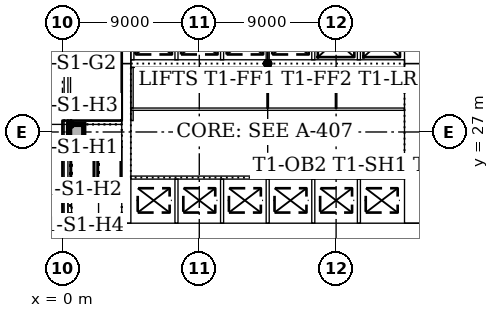
"""IFC4 building model, lengths in metres.
Left out: names, types, materials, properties, quantities, classifications, styles, units other than length and angle.
Written with IfcOpenShell. Run it as: python <this file> out.ifc"""

import sys

from ifc_helpers import new_model, si_unit, direction, frame, frame_2d, origin, origin_2d, place, context, subcontext, project, spatial, rectangle, extrude, element, fill, save


model = new_model("IFC4")
c1 = context("Model", 3, precision=1e-05, world=origin(), true_north=direction((0.0, 1.0)))
c2 = subcontext(c1, "Body", "Model", "MODEL_VIEW")
j1 = project(units=[si_unit("LENGTHUNIT", "METRE"), si_unit("PLANEANGLEUNIT", "RADIAN")], contexts=[c1])
p1 = place(None, origin())
s1 = spatial("IfcSite", under=j1, at=p1, CompositionType="ELEMENT")
p2 = place(p1, origin())
s2 = spatial("IfcBuilding", under=s1, at=p2, CompositionType="ELEMENT")
p3 = place(p2, origin())
s3 = spatial("IfcBuildingStorey", under=s2, at=p3, CompositionType="ELEMENT", Elevation=0.0)
p4 = place(p3, frame((3.9, 20.4, 0.0), z_axis=(0.0, 0.0, 1.0), x_axis=(1.0, 0.0, 0.0)))
e1 = element("IfcWall", 1, at=p4, inside=s3, PredefinedType="SOLIDWALL", context=c2, shape_type="SweptSolid", body=[
    extrude(rectangle(XDim=19.8, YDim=1.2, at=frame_2d((9.9, 0.0))), origin(), (0.0, 0.0, 1.0), 6.0),
])
p5 = place(p3, frame((23.1, 21.0, 0.0), z_axis=(0.0, 0.0, 1.0), x_axis=(0.0, 1.0, 0.0)))
e2 = element("IfcWall", 2, at=p5, inside=s3, PredefinedType="SOLIDWALL", context=c2, shape_type="SweptSolid", body=[
    extrude(rectangle(XDim=10.5, YDim=1.2, at=frame_2d((5.25, 0.0))), origin(), (0.0, 0.0, 1.0), 6.0),
])
p6 = place(p5, frame((4.35, 0.0, 0.0)))
e3 = element("IfcOpeningElement", 3, at=p6, cuts=e2, PredefinedType="OPENING", context=c2, shape_type="SweptSolid", body=[
    extrude(rectangle(XDim=1.8, YDim=2.1, at=frame_2d((0.9, 1.05))), frame((0.0, 0.61, 0.0), z_axis=(0.0, -1.0, 0.0), x_axis=(1.0, 0.0, 0.0)), (0.0, 0.0, 1.0), 1.22),
])
p7 = place(p3, frame((23.1, 31.5, 0.0), z_axis=(0.0, 0.0, 1.0), x_axis=(0.0, 1.0, 0.0)))
e4 = element("IfcWall", 4, at=p7, inside=s3, PredefinedType="SOLIDWALL", context=c2, shape_type="SweptSolid", body=[
    extrude(rectangle(XDim=10.5, YDim=1.2, at=frame_2d((5.25, 0.0))), origin(), (0.0, 0.0, 1.0), 6.0),
])
p8 = place(p7, frame((3.15, 0.0, 0.0)))
e5 = element("IfcOpeningElement", 5, at=p8, cuts=e4, PredefinedType="OPENING", context=c2, shape_type="SweptSolid", body=[
    extrude(rectangle(XDim=1.0, YDim=2.1, at=frame_2d((0.5, 1.05))), frame((0.0, 0.61, 0.0), z_axis=(0.0, -1.0, 0.0), x_axis=(1.0, 0.0, 0.0)), (0.0, 0.0, 1.0), 1.22),
])
p9 = place(p7, frame((5.2, 0.0, 0.0)))
e6 = element("IfcOpeningElement", 6, at=p9, cuts=e4, PredefinedType="OPENING", context=c2, shape_type="SweptSolid", body=[
    extrude(rectangle(XDim=1.0, YDim=2.1, at=frame_2d((0.5, 1.05))), frame((0.0, 0.61, 0.0), z_axis=(0.0, -1.0, 0.0), x_axis=(1.0, 0.0, 0.0)), (0.0, 0.0, 1.0), 1.22),
])
p10 = place(p3, frame((4.2, 42.0, 0.0), z_axis=(0.0, 0.0, 1.0), x_axis=(0.0, -1.0, 0.0)))
e7 = element("IfcWall", 7, at=p10, inside=s3, PredefinedType="SOLIDWALL", context=c2, shape_type="SweptSolid", body=[
    extrude(rectangle(XDim=10.5, YDim=0.6, at=frame_2d((5.25, 0.0))), origin(), (0.0, 0.0, 1.0), 6.0),
])
p11 = place(p10, frame((5.3, 0.0, 0.0)))
e8 = element("IfcOpeningElement", 8, at=p11, cuts=e7, PredefinedType="OPENING", context=c2, shape_type="SweptSolid", body=[
    extrude(rectangle(XDim=1.0, YDim=2.1, at=frame_2d((0.5, 1.05))), frame((0.0, 0.31, 0.0), z_axis=(0.0, -1.0, 0.0), x_axis=(1.0, 0.0, 0.0)), (0.0, 0.0, 1.0), 0.62),
])
p12 = place(p3, frame((4.2, 31.5, 0.0), z_axis=(0.0, 0.0, 1.0), x_axis=(0.0, -1.0, 0.0)))
e9 = element("IfcWall", 9, at=p12, inside=s3, PredefinedType="SOLIDWALL", context=c2, shape_type="SweptSolid", body=[
    extrude(rectangle(XDim=10.5, YDim=0.6, at=frame_2d((5.25, 0.0))), origin(), (0.0, 0.0, 1.0), 6.0),
])
p13 = place(p12, frame((4.25, 0.0, 0.0)))
e10 = element("IfcOpeningElement", 10, at=p13, cuts=e9, PredefinedType="OPENING", context=c2, shape_type="SweptSolid", body=[
    extrude(rectangle(XDim=1.0, YDim=2.1, at=frame_2d((0.5, 1.05))), frame((0.0, 0.31, 0.0), z_axis=(0.0, -1.0, 0.0), x_axis=(1.0, 0.0, 0.0)), (0.0, 0.0, 1.0), 0.62),
])
p14 = place(p3, frame((4.5, 31.5, 0.0), z_axis=(0.0, 0.0, 1.0), x_axis=(1.0, 0.0, 0.0)))
e11 = element("IfcWall", 11, at=p14, inside=s3, PredefinedType="SOLIDWALL", context=c2, shape_type="SweptSolid", body=[
    extrude(rectangle(XDim=18.0, YDim=0.5, at=frame_2d((9.0, 0.0))), origin(), (0.0, 0.0, 1.0), 6.0),
])
p15 = place(p3, frame((0.36, 21.125, 0.0), z_axis=(0.0, 0.0, 1.0), x_axis=(1.0, 0.0, 0.0)))
e12 = element("IfcWall", 12, at=p15, inside=s3, PredefinedType="SOLIDWALL", context=c2, shape_type="SweptSolid", body=[
    extrude(rectangle(XDim=3.54, YDim=0.25, at=frame_2d((1.77, 0.0))), origin(), (0.0, 0.0, 1.0), 6.0),
])
p16 = place(p3, frame((3.9, 27.625, 0.0), z_axis=(0.0, 0.0, 1.0), x_axis=(-1.0, 0.0, 0.0)))
e13 = element("IfcWall", 13, at=p16, inside=s3, PredefinedType="SOLIDWALL", context=c2, shape_type="SweptSolid", body=[
    extrude(rectangle(XDim=3.54, YDim=0.25, at=frame_2d((1.77, 0.0))), origin(), (0.0, 0.0, 1.0), 6.0),
])
p17 = place(p16, frame((0.4, 0.0, 0.0)))
e14 = element("IfcOpeningElement", 14, at=p17, cuts=e13, PredefinedType="OPENING", context=c2, shape_type="SweptSolid", body=[
    extrude(rectangle(XDim=1.0, YDim=2.1, at=frame_2d((0.5, 1.05))), frame((0.0, 0.135, 0.0), z_axis=(0.0, -1.0, 0.0), x_axis=(1.0, 0.0, 0.0)), (0.0, 0.0, 1.0), 0.27),
])
p18 = place(p3, frame((0.235, 21.0, 0.0), z_axis=(0.0, 0.0, 1.0), x_axis=(0.0, 1.0, 0.0)))
e15 = element("IfcWall", 15, at=p18, inside=s3, PredefinedType="SOLIDWALL", context=c2, shape_type="SweptSolid", body=[
    extrude(rectangle(XDim=21.0, YDim=0.25, at=frame_2d((10.5, 0.0))), origin(), (0.0, 0.0, 1.0), 6.0),
])
p19 = place(p18, frame((10.0, 0.0, 0.0)))
e16 = element("IfcOpeningElement", 16, at=p19, cuts=e15, PredefinedType="OPENING", context=c2, shape_type="SweptSolid", body=[
    extrude(rectangle(XDim=1.0, YDim=2.1, at=frame_2d((0.5, 1.05))), frame((0.0, 0.135, 0.0), z_axis=(0.0, -1.0, 0.0), x_axis=(1.0, 0.0, 0.0)), (0.0, 0.0, 1.0), 0.27),
])
p20 = place(p3, frame((0.9, 27.0, 0.0), z_axis=(0.0, 0.0, 1.0), x_axis=(1.0, 0.0, 0.0)))
e17 = element("IfcColumn", 17, at=p20, inside=s3, PredefinedType="COLUMN", context=c2, shape_type="SweptSolid", body=[
    extrude(rectangle(XDim=1.0, YDim=1.0, at=origin_2d()), origin(), (0.0, 0.0, 1.0), 6.0),
])
p21 = place(p3, frame((0.0, 3.7, 0.0), z_axis=(0.0, 0.0, 1.0), x_axis=(0.0, 1.0, 0.0)))
e18 = element("IfcWall", 18, at=p21, inside=s3, PredefinedType="PARTITIONING", context=c2, shape_type="SweptSolid", body=[
    extrude(rectangle(XDim=17.3, YDim=0.2, at=frame_2d((8.65, 0.0))), origin(), (0.0, 0.0, 1.0), 5.7),
])
p22 = place(p21, frame((7.7, 0.0, 0.0)))
e19 = element("IfcOpeningElement", 19, at=p22, cuts=e18, PredefinedType="OPENING", context=c2, shape_type="SweptSolid", body=[
    extrude(rectangle(XDim=1.8, YDim=2.1, at=frame_2d((0.9, 1.05))), frame((0.0, 0.11, 0.0), z_axis=(0.0, -1.0, 0.0), x_axis=(1.0, 0.0, 0.0)), (0.0, 0.0, 1.0), 0.22),
])
p23 = place(p3, frame((0.48, 21.25, 0.0), z_axis=(0.0, 0.0, 1.0), x_axis=(0.0, 1.0, 0.0)))
e20 = element("IfcWall", 20, at=p23, inside=s3, PredefinedType="STANDARD", context=c2, shape_type="SweptSolid", body=[
    extrude(rectangle(XDim=1.955, YDim=0.24, at=frame_2d((0.978, 0.0))), origin(), (0.0, 0.0, 1.0), 6.0),
])
p24 = place(p3, frame((4.5, 24.0, 0.0), z_axis=(0.0, 0.0, 1.0), x_axis=(1.0, 0.0, 0.0)))
e21 = element("IfcWall", 21, at=p24, inside=s3, PredefinedType="PARTITIONING", context=c2, shape_type="SweptSolid", body=[
    extrude(rectangle(XDim=18.0, YDim=0.2, at=frame_2d((9.0, 0.0))), origin(), (0.0, 0.0, 1.0), 5.7),
])
p25 = place(p24, frame((0.95, 0.0, 0.0)))
e22 = element("IfcOpeningElement", 22, at=p25, cuts=e21, PredefinedType="OPENING", context=c2, shape_type="SweptSolid", body=[
    extrude(rectangle(XDim=1.1, YDim=2.1, at=frame_2d((0.55, 1.05))), frame((0.0, 0.11, 0.0), z_axis=(0.0, -1.0, 0.0), x_axis=(1.0, 0.0, 0.0)), (0.0, 0.0, 1.0), 0.22),
])
p26 = place(p24, frame((3.95, 0.0, 0.0)))
e23 = element("IfcOpeningElement", 23, at=p26, cuts=e21, PredefinedType="OPENING", context=c2, shape_type="SweptSolid", body=[
    extrude(rectangle(XDim=1.1, YDim=2.1, at=frame_2d((0.55, 1.05))), frame((0.0, 0.11, 0.0), z_axis=(0.0, -1.0, 0.0), x_axis=(1.0, 0.0, 0.0)), (0.0, 0.0, 1.0), 0.22),
])
p27 = place(p24, frame((6.95, 0.0, 0.0)))
e24 = element("IfcOpeningElement", 24, at=p27, cuts=e21, PredefinedType="OPENING", context=c2, shape_type="SweptSolid", body=[
    extrude(rectangle(XDim=1.1, YDim=2.1, at=frame_2d((0.55, 1.05))), frame((0.0, 0.11, 0.0), z_axis=(0.0, -1.0, 0.0), x_axis=(1.0, 0.0, 0.0)), (0.0, 0.0, 1.0), 0.22),
])
p28 = place(p24, frame((9.95, 0.0, 0.0)))
e25 = element("IfcOpeningElement", 25, at=p28, cuts=e21, PredefinedType="OPENING", context=c2, shape_type="SweptSolid", body=[
    extrude(rectangle(XDim=1.1, YDim=2.1, at=frame_2d((0.55, 1.05))), frame((0.0, 0.11, 0.0), z_axis=(0.0, -1.0, 0.0), x_axis=(1.0, 0.0, 0.0)), (0.0, 0.0, 1.0), 0.22),
])
p29 = place(p24, frame((12.95, 0.0, 0.0)))
e26 = element("IfcOpeningElement", 26, at=p29, cuts=e21, PredefinedType="OPENING", context=c2, shape_type="SweptSolid", body=[
    extrude(rectangle(XDim=1.1, YDim=2.1, at=frame_2d((0.55, 1.05))), frame((0.0, 0.11, 0.0), z_axis=(0.0, -1.0, 0.0), x_axis=(1.0, 0.0, 0.0)), (0.0, 0.0, 1.0), 0.22),
])
p30 = place(p24, frame((15.95, 0.0, 0.0)))
e27 = element("IfcOpeningElement", 27, at=p30, cuts=e21, PredefinedType="OPENING", context=c2, shape_type="SweptSolid", body=[
    extrude(rectangle(XDim=1.1, YDim=2.1, at=frame_2d((0.55, 1.05))), frame((0.0, 0.11, 0.0), z_axis=(0.0, -1.0, 0.0), x_axis=(1.0, 0.0, 0.0)), (0.0, 0.0, 1.0), 0.22),
])
p31 = place(p3, frame((4.6, 31.75, 0.0), z_axis=(0.0, 0.0, 1.0), x_axis=(0.0, 1.0, 0.0)))
e28 = element("IfcWall", 28, at=p31, inside=s3, PredefinedType="PARTITIONING", context=c2, shape_type="SweptSolid", body=[
    extrude(rectangle(XDim=2.65, YDim=0.2, at=frame_2d((1.325, 0.0))), origin(), (0.0, 0.0, 1.0), 5.7),
])
p32 = place(p3, frame((7.5, 21.0, 0.0), z_axis=(0.0, 0.0, 1.0), x_axis=(0.0, 1.0, 0.0)))
e29 = element("IfcWall", 29, at=p32, inside=s3, PredefinedType="PARTITIONING", context=c2, shape_type="SweptSolid", body=[
    extrude(rectangle(XDim=2.9, YDim=0.2, at=frame_2d((1.45, 0.0))), origin(), (0.0, 0.0, 1.0), 5.7),
])
p33 = place(p3, frame((7.5, 31.75, 0.0), z_axis=(0.0, 0.0, 1.0), x_axis=(0.0, 1.0, 0.0)))
e30 = element("IfcWall", 30, at=p33, inside=s3, PredefinedType="PARTITIONING", context=c2, shape_type="SweptSolid", body=[
    extrude(rectangle(XDim=2.65, YDim=0.2, at=frame_2d((1.325, 0.0))), origin(), (0.0, 0.0, 1.0), 5.7),
])
p34 = place(p3, frame((10.5, 21.0, 0.0), z_axis=(0.0, 0.0, 1.0), x_axis=(0.0, 1.0, 0.0)))
e31 = element("IfcWall", 31, at=p34, inside=s3, PredefinedType="PARTITIONING", context=c2, shape_type="SweptSolid", body=[
    extrude(rectangle(XDim=2.9, YDim=0.2, at=frame_2d((1.45, 0.0))), origin(), (0.0, 0.0, 1.0), 5.7),
])
p35 = place(p3, frame((10.5, 31.75, 0.0), z_axis=(0.0, 0.0, 1.0), x_axis=(0.0, 1.0, 0.0)))
e32 = element("IfcWall", 32, at=p35, inside=s3, PredefinedType="PARTITIONING", context=c2, shape_type="SweptSolid", body=[
    extrude(rectangle(XDim=2.65, YDim=0.2, at=frame_2d((1.325, 0.0))), origin(), (0.0, 0.0, 1.0), 5.7),
])
p36 = place(p3, frame((13.5, 21.0, 0.0), z_axis=(0.0, 0.0, 1.0), x_axis=(0.0, 1.0, 0.0)))
e33 = element("IfcWall", 33, at=p36, inside=s3, PredefinedType="PARTITIONING", context=c2, shape_type="SweptSolid", body=[
    extrude(rectangle(XDim=2.9, YDim=0.2, at=frame_2d((1.45, 0.0))), origin(), (0.0, 0.0, 1.0), 5.7),
])
p37 = place(p3, frame((13.5, 31.75, 0.0), z_axis=(0.0, 0.0, 1.0), x_axis=(0.0, 1.0, 0.0)))
e34 = element("IfcWall", 34, at=p37, inside=s3, PredefinedType="PARTITIONING", context=c2, shape_type="SweptSolid", body=[
    extrude(rectangle(XDim=2.65, YDim=0.2, at=frame_2d((1.325, 0.0))), origin(), (0.0, 0.0, 1.0), 5.7),
])
p38 = place(p3, frame((16.5, 21.0, 0.0), z_axis=(0.0, 0.0, 1.0), x_axis=(0.0, 1.0, 0.0)))
e35 = element("IfcWall", 35, at=p38, inside=s3, PredefinedType="PARTITIONING", context=c2, shape_type="SweptSolid", body=[
    extrude(rectangle(XDim=2.9, YDim=0.2, at=frame_2d((1.45, 0.0))), origin(), (0.0, 0.0, 1.0), 5.7),
])
p39 = place(p3, frame((16.5, 31.75, 0.0), z_axis=(0.0, 0.0, 1.0), x_axis=(0.0, 1.0, 0.0)))
e36 = element("IfcWall", 36, at=p39, inside=s3, PredefinedType="PARTITIONING", context=c2, shape_type="SweptSolid", body=[
    extrude(rectangle(XDim=2.65, YDim=0.2, at=frame_2d((1.325, 0.0))), origin(), (0.0, 0.0, 1.0), 5.7),
])
p40 = place(p3, frame((19.5, 21.0, 0.0), z_axis=(0.0, 0.0, 1.0), x_axis=(0.0, 1.0, 0.0)))
e37 = element("IfcWall", 37, at=p40, inside=s3, PredefinedType="PARTITIONING", context=c2, shape_type="SweptSolid", body=[
    extrude(rectangle(XDim=2.9, YDim=0.2, at=frame_2d((1.45, 0.0))), origin(), (0.0, 0.0, 1.0), 5.7),
])
p41 = place(p3, frame((19.5, 31.75, 0.0), z_axis=(0.0, 0.0, 1.0), x_axis=(0.0, 1.0, 0.0)))
e38 = element("IfcWall", 38, at=p41, inside=s3, PredefinedType="PARTITIONING", context=c2, shape_type="SweptSolid", body=[
    extrude(rectangle(XDim=2.65, YDim=0.2, at=frame_2d((1.325, 0.0))), origin(), (0.0, 0.0, 1.0), 5.7),
])
p42 = place(p3, frame((4.5, 28.5, 0.0), z_axis=(0.0, 0.0, 1.0), x_axis=(1.0, 0.0, 0.0)))
e39 = element("IfcWall", 39, at=p42, inside=s3, PredefinedType="PARTITIONING", context=c2, shape_type="SweptSolid", body=[
    extrude(rectangle(XDim=18.0, YDim=0.15, at=frame_2d((9.0, 0.0))), origin(), (0.0, 0.0, 1.0), 5.7),
])
p43 = place(p42, frame((4.1, 0.0, 0.0)))
e40 = element("IfcOpeningElement", 40, at=p43, cuts=e39, PredefinedType="OPENING", context=c2, shape_type="SweptSolid", body=[
    extrude(rectangle(XDim=0.9, YDim=2.1, at=frame_2d((0.45, 1.05))), frame((0.0, 0.085, 0.0), z_axis=(0.0, -1.0, 0.0), x_axis=(1.0, 0.0, 0.0)), (0.0, 0.0, 1.0), 0.17),
])
p44 = place(p42, frame((10.8, 0.0, 0.0)))
e41 = element("IfcOpeningElement", 41, at=p44, cuts=e39, PredefinedType="OPENING", context=c2, shape_type="SweptSolid", body=[
    extrude(rectangle(XDim=0.9, YDim=2.1, at=frame_2d((0.45, 1.05))), frame((0.0, 0.085, 0.0), z_axis=(0.0, -1.0, 0.0), x_axis=(1.0, 0.0, 0.0)), (0.0, 0.0, 1.0), 0.17),
])
p45 = place(p42, frame((15.2, 0.0, 0.0)))
e42 = element("IfcOpeningElement", 42, at=p45, cuts=e39, PredefinedType="OPENING", context=c2, shape_type="SweptSolid", body=[
    extrude(rectangle(XDim=0.9, YDim=2.1, at=frame_2d((0.45, 1.05))), frame((0.0, 0.085, 0.0), z_axis=(0.0, -1.0, 0.0), x_axis=(1.0, 0.0, 0.0)), (0.0, 0.0, 1.0), 0.17),
])
p46 = place(p3, frame((4.575, 27.75, 0.0), z_axis=(0.0, 0.0, 1.0), x_axis=(0.0, 1.0, 0.0)))
e43 = element("IfcWall", 43, at=p46, inside=s3, PredefinedType="PARTITIONING", context=c2, shape_type="SweptSolid", body=[
    extrude(rectangle(XDim=0.675, YDim=0.15, at=frame_2d((0.338, 0.0))), origin(), (0.0, 0.0, 1.0), 5.7),
])
p47 = place(p3, frame((4.575, 28.575, 0.0), z_axis=(0.0, 0.0, 1.0), x_axis=(0.0, 1.0, 0.0)))
e44 = element("IfcWall", 44, at=p47, inside=s3, PredefinedType="PARTITIONING", context=c2, shape_type="SweptSolid", body=[
    extrude(rectangle(XDim=2.675, YDim=0.15, at=frame_2d((1.337, 0.0))), origin(), (0.0, 0.0, 1.0), 5.7),
])
for number, where, z_axis, x_axis in (
    (45, (13.5, 28.575, 0.0), (0.0, 0.0, 1.0), (0.0, 1.0, 0.0)),
    (46, (18.0, 28.575, 0.0), (0.0, 0.0, 1.0), (0.0, 1.0, 0.0)),
):
    element("IfcWall", number, at=place(p3, frame(where, z_axis=z_axis, x_axis=x_axis)), inside=s3, PredefinedType="PARTITIONING", context=c2, shape_type="SweptSolid", body=[
        extrude(rectangle(XDim=2.675, YDim=0.1, at=frame_2d((1.337, 0.0))), origin(), (0.0, 0.0, 1.0), 5.7),
    ])
p48 = place(p13, frame((1.0, 0.0, 0.0), z_axis=(0.0, 0.0, 1.0), x_axis=(-1.0, 0.0, 0.0)))
e47 = element("IfcDoor", 47, at=p48, inside=s3, OperationType="SINGLE_SWING_RIGHT", PredefinedType="DOOR", context=c2, shape_type="SweptSolid", body=[
    extrude(rectangle(XDim=1.0, YDim=2.1, at=frame_2d((0.5, 1.05))), frame((0.0, 0.025, 0.0), z_axis=(0.0, -1.0, 0.0), x_axis=(1.0, 0.0, 0.0)), (0.0, 0.0, 1.0), 0.05),
])
fill(e10, e47)
p49 = place(p17, origin())
e48 = element("IfcDoor", 48, at=p49, inside=s3, OperationType="SINGLE_SWING_LEFT", PredefinedType="DOOR", context=c2, shape_type="SweptSolid", body=[
    extrude(rectangle(XDim=1.0, YDim=2.1, at=frame_2d((0.5, 1.05))), frame((0.0, 0.025, 0.0), z_axis=(0.0, -1.0, 0.0), x_axis=(1.0, 0.0, 0.0)), (0.0, 0.0, 1.0), 0.05),
])
fill(e14, e48)
p50 = place(p25, origin())
e49 = element("IfcDoor", 49, at=p50, inside=s3, OperationType="SLIDING_TO_LEFT", PredefinedType="DOOR", context=c2, shape_type="SweptSolid", body=[
    extrude(rectangle(XDim=1.1, YDim=2.1, at=frame_2d((0.55, 1.05))), frame((0.0, 0.025, 0.0), z_axis=(0.0, -1.0, 0.0), x_axis=(1.0, 0.0, 0.0)), (0.0, 0.0, 1.0), 0.05),
])
fill(e22, e49)
p51 = place(p26, origin())
e50 = element("IfcDoor", 50, at=p51, inside=s3, OperationType="SLIDING_TO_LEFT", PredefinedType="DOOR", context=c2, shape_type="SweptSolid", body=[
    extrude(rectangle(XDim=1.1, YDim=2.1, at=frame_2d((0.55, 1.05))), frame((0.0, 0.025, 0.0), z_axis=(0.0, -1.0, 0.0), x_axis=(1.0, 0.0, 0.0)), (0.0, 0.0, 1.0), 0.05),
])
fill(e23, e50)
p52 = place(p27, origin())
e51 = element("IfcDoor", 51, at=p52, inside=s3, OperationType="SLIDING_TO_LEFT", PredefinedType="DOOR", context=c2, shape_type="SweptSolid", body=[
    extrude(rectangle(XDim=1.1, YDim=2.1, at=frame_2d((0.55, 1.05))), frame((0.0, 0.025, 0.0), z_axis=(0.0, -1.0, 0.0), x_axis=(1.0, 0.0, 0.0)), (0.0, 0.0, 1.0), 0.05),
])
fill(e24, e51)
p53 = place(p28, origin())
e52 = element("IfcDoor", 52, at=p53, inside=s3, OperationType="SLIDING_TO_LEFT", PredefinedType="DOOR", context=c2, shape_type="SweptSolid", body=[
    extrude(rectangle(XDim=1.1, YDim=2.1, at=frame_2d((0.55, 1.05))), frame((0.0, 0.025, 0.0), z_axis=(0.0, -1.0, 0.0), x_axis=(1.0, 0.0, 0.0)), (0.0, 0.0, 1.0), 0.05),
])
fill(e25, e52)
p54 = place(p29, origin())
e53 = element("IfcDoor", 53, at=p54, inside=s3, OperationType="SLIDING_TO_LEFT", PredefinedType="DOOR", context=c2, shape_type="SweptSolid", body=[
    extrude(rectangle(XDim=1.1, YDim=2.1, at=frame_2d((0.55, 1.05))), frame((0.0, 0.025, 0.0), z_axis=(0.0, -1.0, 0.0), x_axis=(1.0, 0.0, 0.0)), (0.0, 0.0, 1.0), 0.05),
])
fill(e26, e53)
p55 = place(p30, origin())
e54 = element("IfcDoor", 54, at=p55, inside=s3, OperationType="SLIDING_TO_LEFT", PredefinedType="DOOR", context=c2, shape_type="SweptSolid", body=[
    extrude(rectangle(XDim=1.1, YDim=2.1, at=frame_2d((0.55, 1.05))), frame((0.0, 0.025, 0.0), z_axis=(0.0, -1.0, 0.0), x_axis=(1.0, 0.0, 0.0)), (0.0, 0.0, 1.0), 0.05),
])
fill(e27, e54)
p56 = place(p6, origin())
e55 = element("IfcDoor", 55, at=p56, inside=s3, OperationType="DOUBLE_DOOR_DOUBLE_SWING", PredefinedType="DOOR", context=c2, shape_type="SweptSolid", body=[
    extrude(rectangle(XDim=1.8, YDim=2.1, at=frame_2d((0.9, 1.05))), frame((0.0, 0.025, 0.0), z_axis=(0.0, -1.0, 0.0), x_axis=(1.0, 0.0, 0.0)), (0.0, 0.0, 1.0), 0.05),
])
fill(e3, e55)
p57 = place(p43, origin())
e56 = element("IfcDoor", 56, at=p57, inside=s3, OperationType="SINGLE_SWING_LEFT", PredefinedType="DOOR", context=c2, shape_type="SweptSolid", body=[
    extrude(rectangle(XDim=0.9, YDim=2.1, at=frame_2d((0.45, 1.05))), frame((0.0, 0.025, 0.0), z_axis=(0.0, -1.0, 0.0), x_axis=(1.0, 0.0, 0.0)), (0.0, 0.0, 1.0), 0.05),
])
fill(e40, e56)
p58 = place(p44, origin())
e57 = element("IfcDoor", 57, at=p58, inside=s3, OperationType="SINGLE_SWING_LEFT", PredefinedType="DOOR", context=c2, shape_type="SweptSolid", body=[
    extrude(rectangle(XDim=0.9, YDim=2.1, at=frame_2d((0.45, 1.05))), frame((0.0, 0.025, 0.0), z_axis=(0.0, -1.0, 0.0), x_axis=(1.0, 0.0, 0.0)), (0.0, 0.0, 1.0), 0.05),
])
fill(e41, e57)
p59 = place(p45, origin())
e58 = element("IfcDoor", 58, at=p59, inside=s3, OperationType="SINGLE_SWING_LEFT", PredefinedType="DOOR", context=c2, shape_type="SweptSolid", body=[
    extrude(rectangle(XDim=0.9, YDim=2.1, at=frame_2d((0.45, 1.05))), frame((0.0, 0.025, 0.0), z_axis=(0.0, -1.0, 0.0), x_axis=(1.0, 0.0, 0.0)), (0.0, 0.0, 1.0), 0.05),
])
fill(e42, e58)
p60 = place(p19, origin())
e59 = element("IfcDoor", 59, at=p60, inside=s3, OperationType="SINGLE_SWING_RIGHT", PredefinedType="DOOR", context=c2, shape_type="SweptSolid", body=[
    extrude(rectangle(XDim=1.0, YDim=2.1, at=frame_2d((0.5, 1.05))), frame((0.0, 0.025, 0.0), z_axis=(0.0, -1.0, 0.0), x_axis=(1.0, 0.0, 0.0)), (0.0, 0.0, 1.0), 0.05),
])
fill(e16, e59)
save(model, sys.argv[1])
